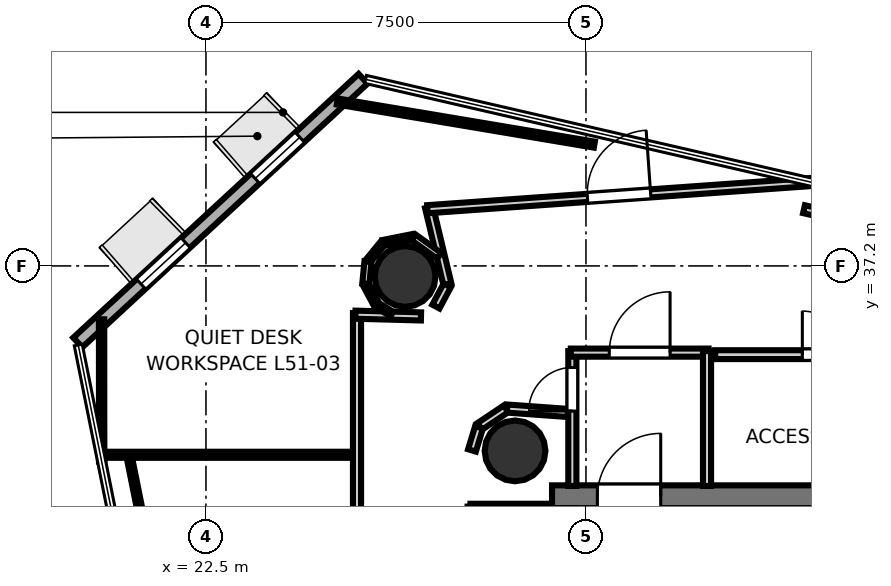
"""IFC4 building model, lengths in metres.
Left out: names, types, materials, properties, quantities, classifications, styles, units other than length and angle.
Written with IfcOpenShell. Run it as: python <this file> out.ifc"""

import sys

from ifc_helpers import new_model, si_unit, direction, frame, frame_2d, origin, origin_2d, place, context, subcontext, project, spatial, rectangle, hollow_circle, extrude, element, fill, save


model = new_model("IFC4")
c1 = context("Model", 3, precision=1e-05, world=origin(), true_north=direction((0.0, 1.0)))
c2 = subcontext(c1, "Body", "Model", "MODEL_VIEW")
j1 = project(units=[si_unit("LENGTHUNIT", "METRE"), si_unit("PLANEANGLEUNIT", "RADIAN")], contexts=[c1])
p1 = place(None, origin())
s1 = spatial("IfcSite", under=j1, at=p1, CompositionType="ELEMENT")
p2 = place(p1, origin())
s2 = spatial("IfcBuilding", under=s1, at=p2, CompositionType="ELEMENT")
p3 = place(p2, frame((0.0, 0.0, 200.3)))
s3 = spatial("IfcBuildingStorey", under=s2, at=p3, CompositionType="ELEMENT", Elevation=200.3)
p4 = place(p3, frame((29.33, 32.645, 0.0), z_axis=(0.0, 0.0, 1.0), x_axis=(1.0, 0.0, 0.0)))
e1 = element("IfcWall", 1, at=p4, inside=s3, PredefinedType="SHEAR", context=c2, shape_type="SweptSolid", body=[
    extrude(rectangle(XDim=10.52, YDim=0.45, at=frame_2d((5.26, 0.0))), origin(), (0.0, 0.0, 1.0), 3.52),
])
p5 = place(p4, frame((0.895, 0.0, 0.0)))
e2 = element("IfcOpeningElement", 2, at=p5, cuts=e1, PredefinedType="OPENING", context=c2, shape_type="SweptSolid", body=[
    extrude(rectangle(XDim=1.25, YDim=2.15, at=frame_2d((0.625, 1.075))), frame((0.0, 0.235, 0.0), z_axis=(0.0, -1.0, 0.0), x_axis=(1.0, 0.0, 0.0)), (0.0, 0.0, 1.0), 0.47),
])
for number, where, z_axis, x_axis in (
    (3, (28.6, 33.55, 0.0), (0.0, 0.0, 1.0), (1.0, 0.0, 0.0)),
    (4, (26.431, 36.992, 0.0), (0.0, 0.0, 1.0), (1.0, 0.0, 0.0)),
):
    element("IfcColumn", number, at=place(p3, frame(where, z_axis=z_axis, x_axis=x_axis)), inside=s3, PredefinedType="COLUMN", context=c2, shape_type="SweptSolid", body=[
        extrude(hollow_circle(Radius=0.6, WallThickness=0.03, at=origin_2d()), origin(), (0.0, 0.0, 1.0), 3.7),
    ])
p6 = place(p3, frame((25.601, 40.893, 0.0), z_axis=(0.0, 0.0, 1.0), x_axis=(-0.734371177533, -0.678748092896, 0.0)))
e5 = element("IfcWall", 5, at=p6, inside=s3, PredefinedType="SOLIDWALL", context=c2, shape_type="SweptSolid", body=[
    extrude(rectangle(XDim=7.668, YDim=0.26, at=frame_2d((3.834, 0.0))), origin(), (0.0, 0.0, 1.0), 3.52),
])
p7 = place(p6, frame((1.7, 0.0, 0.9)))
e6 = element("IfcOpeningElement", 6, at=p7, cuts=e5, PredefinedType="OPENING", context=c2, shape_type="SweptSolid", body=[
    extrude(rectangle(XDim=1.2, YDim=2.0, at=frame_2d((0.6, 1.0))), frame((0.0, 0.14, 0.0), z_axis=(0.0, -1.0, 0.0), x_axis=(1.0, 0.0, 0.0)), (0.0, 0.0, 1.0), 0.28),
])
p8 = place(p6, frame((4.768, 0.0, 0.9)))
e7 = element("IfcOpeningElement", 7, at=p8, cuts=e5, PredefinedType="OPENING", context=c2, shape_type="SweptSolid", body=[
    extrude(rectangle(XDim=1.2, YDim=2.0, at=frame_2d((0.6, 1.0))), frame((0.0, 0.14, 0.0), z_axis=(0.0, -1.0, 0.0), x_axis=(1.0, 0.0, 0.0)), (0.0, 0.0, 1.0), 0.28),
])
p9 = place(p3, frame((29.731, 32.858, 0.0), z_axis=(0.0, 0.0, 1.0), x_axis=(0.0, 1.0, 0.0)))
e8 = element("IfcWall", 8, at=p9, inside=s3, PredefinedType="PARTITIONING", context=c2, shape_type="SweptSolid", body=[
    extrude(rectangle(XDim=2.662, YDim=0.16, at=frame_2d((1.331, 0.0))), origin(), (0.0, 0.0, 1.0), 2.84),
])
p10 = place(p9, frame((1.478, 0.0, 0.0)))
e9 = element("IfcOpeningElement", 9, at=p10, cuts=e8, PredefinedType="OPENING", context=c2, shape_type="SweptSolid", body=[
    extrude(rectangle(XDim=0.86, YDim=2.05, at=frame_2d((0.43, 1.025))), frame((0.0, 0.09, 0.0), z_axis=(0.0, -1.0, 0.0), x_axis=(1.0, 0.0, 0.0)), (0.0, 0.0, 1.0), 0.18),
])
p11 = place(p3, frame((29.7, 35.489, 0.0), z_axis=(0.0, 0.0, 1.0), x_axis=(1.0, 0.0, 0.0)))
e10 = element("IfcWall", 10, at=p11, inside=s3, PredefinedType="PARTITIONING", context=c2, shape_type="SweptSolid", body=[
    extrude(rectangle(XDim=2.72, YDim=0.16, at=frame_2d((1.36, 0.0))), origin(), (0.0, 0.0, 1.0), 2.84),
])
p12 = place(p11, frame((0.76, 0.0, 0.0)))
e11 = element("IfcOpeningElement", 11, at=p12, cuts=e10, PredefinedType="OPENING", context=c2, shape_type="SweptSolid", body=[
    extrude(rectangle(XDim=1.2, YDim=2.15, at=frame_2d((0.6, 1.075))), frame((0.0, 0.09, 0.0), z_axis=(0.0, -1.0, 0.0), x_axis=(1.0, 0.0, 0.0)), (0.0, 0.0, 1.0), 0.18),
])
p13 = place(p3, frame((32.389, 35.52, 0.0), z_axis=(0.0, 0.0, 1.0), x_axis=(0.0, -1.0, 0.0)))
e12 = element("IfcWall", 12, at=p13, inside=s3, PredefinedType="PARTITIONING", context=c2, shape_type="SweptSolid", body=[
    extrude(rectangle(XDim=2.662, YDim=0.16, at=frame_2d((1.331, 0.0))), origin(), (0.0, 0.0, 1.0), 2.84),
])
p14 = place(p3, frame((32.55, 35.449, 0.0), z_axis=(0.0, 0.0, 1.0), x_axis=(1.0, 0.0, 0.0)))
e13 = element("IfcWall", 13, at=p14, inside=s3, PredefinedType="PLUMBINGWALL", context=c2, shape_type="SweptSolid", body=[
    extrude(rectangle(XDim=4.3, YDim=0.175, at=frame_2d((2.15, 0.0))), origin(), (0.0, 0.0, 1.0), 2.84),
])
p15 = place(p14, frame((1.72, 0.0, 0.0)))
e14 = element("IfcOpeningElement", 14, at=p15, cuts=e13, PredefinedType="OPENING", context=c2, shape_type="SweptSolid", body=[
    extrude(rectangle(XDim=0.86, YDim=2.05, at=frame_2d((0.43, 1.025))), frame((0.0, 0.097, 0.0), z_axis=(0.0, -1.0, 0.0), x_axis=(1.0, 0.0, 0.0)), (0.0, 0.0, 1.0), 0.195),
])
p16 = place(p3, frame((27.751, 28.48, 0.0), z_axis=(0.0, 0.0, 1.0), x_axis=(0.0, 1.0, 0.0)))
e15 = element("IfcWall", 15, at=p16, inside=s3, PredefinedType="PLUMBINGWALL", context=c2, shape_type="SweptSolid", body=[
    extrude(rectangle(XDim=3.97, YDim=0.175, at=frame_2d((1.985, 0.0))), origin(), (0.0, 0.0, 1.0), 2.84),
])
p17 = place(p16, frame((1.555, 0.0, 0.0)))
e16 = element("IfcOpeningElement", 16, at=p17, cuts=e15, PredefinedType="OPENING", context=c2, shape_type="SweptSolid", body=[
    extrude(rectangle(XDim=0.86, YDim=2.05, at=frame_2d((0.43, 1.025))), frame((0.0, 0.097, 0.0), z_axis=(0.0, -1.0, 0.0), x_axis=(1.0, 0.0, 0.0)), (0.0, 0.0, 1.0), 0.195),
])
p18 = place(p3, frame((27.72, 32.419, 0.0), z_axis=(0.0, 0.0, 1.0), x_axis=(1.0, 0.0, 0.0)))
e17 = element("IfcWall", 17, at=p18, inside=s3, PredefinedType="PLUMBINGWALL", context=c2, shape_type="SweptSolid", body=[
    extrude(rectangle(XDim=1.5, YDim=0.175, at=frame_2d((0.75, 0.0))), origin(), (0.0, 0.0, 1.0), 2.84),
])
p19 = place(p3, frame((29.189, 32.45, 0.0), z_axis=(0.0, 0.0, 1.0), x_axis=(0.0, -1.0, 0.0)))
e18 = element("IfcWall", 18, at=p19, inside=s3, PredefinedType="PLUMBINGWALL", context=c2, shape_type="SweptSolid", body=[
    extrude(rectangle(XDim=3.97, YDim=0.175, at=frame_2d((1.985, 0.0))), origin(), (0.0, 0.0, 1.0), 2.84),
])
p20 = place(p3, frame((27.265, 36.839, 0.0), z_axis=(0.0, 0.0, 1.0), x_axis=(-0.232734022169, 0.972540423286, 0.0)))
e19 = element("IfcWall", 19, at=p20, inside=s3, PredefinedType="PARTITIONING", context=c2, shape_type="SweptSolid", body=[
    extrude(rectangle(XDim=1.561, YDim=0.16, at=frame_2d((0.781, 0.0))), origin(), (0.0, 0.0, 1.0), 2.84),
])
p21 = place(p3, frame((26.872, 38.319, 0.0), z_axis=(0.0, 0.0, 1.0), x_axis=(0.997497948336, 0.070695424642, 0.0)))
e20 = element("IfcWall", 20, at=p21, inside=s3, PredefinedType="PARTITIONING", context=c2, shape_type="SweptSolid", body=[
    extrude(rectangle(XDim=7.58, YDim=0.16, at=frame_2d((3.79, 0.0))), origin(), (0.0, 0.0, 1.0), 2.84),
])
p22 = place(p21, frame((3.165, 0.0, 0.0)))
e21 = element("IfcOpeningElement", 21, at=p22, cuts=e20, PredefinedType="OPENING", context=c2, shape_type="SweptSolid", body=[
    extrude(rectangle(XDim=1.25, YDim=2.2, at=frame_2d((0.625, 1.1))), frame((0.0, 0.09, 0.0), z_axis=(0.0, -1.0, 0.0), x_axis=(1.0, 0.0, 0.0)), (0.0, 0.0, 1.0), 0.18),
])
p23 = place(p3, frame((34.302, 38.32, 0.0), z_axis=(0.0, 0.0, 1.0), x_axis=(0.974391195695, -0.224859506699, 0.0)))
e22 = element("IfcWall", 22, at=p23, inside=s3, PredefinedType="PARTITIONING", context=c2, shape_type="SweptSolid", body=[
    extrude(rectangle(XDim=2.915, YDim=0.16, at=frame_2d((1.458, 0.0))), origin(), (0.0, 0.0, 1.0), 2.84),
])
p24 = place(p3, frame((29.64, 34.299, 0.0), z_axis=(0.0, 0.0, 1.0), x_axis=(-0.997392224386, 0.072171675429, 0.0)))
e23 = element("IfcWall", 23, at=p24, inside=s3, PredefinedType="PARTITIONING", context=c2, shape_type="SweptSolid", body=[
    extrude(rectangle(XDim=1.201, YDim=0.16, at=frame_2d((0.601, 0.0))), origin(), (0.0, 0.0, 1.0), 2.84),
])
p25 = place(p3, frame((28.423, 34.38, 0.0), z_axis=(0.0, 0.0, 1.0), x_axis=(-0.831571279003, -0.555418047903, 0.0)))
e24 = element("IfcWall", 24, at=p25, inside=s3, PredefinedType="PARTITIONING", context=c2, shape_type="SweptSolid", body=[
    extrude(rectangle(XDim=0.628, YDim=0.16, at=frame_2d((0.314, 0.0))), origin(), (0.0, 0.0, 1.0), 2.84),
])
p26 = place(p3, frame((27.888, 34.015, 0.0), z_axis=(0.0, 0.0, 1.0), x_axis=(-0.290263585829, -0.956946733492, 0.0)))
e25 = element("IfcWall", 25, at=p26, inside=s3, PredefinedType="PARTITIONING", context=c2, shape_type="SweptSolid", body=[
    extrude(rectangle(XDim=0.476, YDim=0.16, at=frame_2d((0.238, 0.0))), origin(), (0.0, 0.0, 1.0), 2.84),
])
p27 = place(p3, frame((25.481, 18.05, 0.0), z_axis=(0.0, 0.0, 1.0), x_axis=(0.0, 1.0, 0.0)))
e26 = element("IfcWall", 26, at=p27, inside=s3, PredefinedType="PARTITIONING", context=c2, shape_type="SweptSolid", body=[
    extrude(rectangle(XDim=18.219, YDim=0.16, at=frame_2d((9.109, 0.0))), origin(), (0.0, 0.0, 1.0), 2.84),
])
p28 = place(p27, frame((0.649, 0.0, 0.0)))
e27 = element("IfcOpeningElement", 27, at=p28, cuts=e26, PredefinedType="OPENING", context=c2, shape_type="SweptSolid", body=[
    extrude(rectangle(XDim=1.05, YDim=2.15, at=frame_2d((0.525, 1.075))), frame((0.0, 0.09, 0.0), z_axis=(0.0, -1.0, 0.0), x_axis=(1.0, 0.0, 0.0)), (0.0, 0.0, 1.0), 0.18),
])
p29 = place(p27, frame((9.975, 0.0, 0.0)))
e28 = element("IfcOpeningElement", 28, at=p29, cuts=e26, PredefinedType="OPENING", context=c2, shape_type="SweptSolid", body=[
    extrude(rectangle(XDim=1.25, YDim=2.2, at=frame_2d((0.625, 1.1))), frame((0.0, 0.09, 0.0), z_axis=(0.0, -1.0, 0.0), x_axis=(1.0, 0.0, 0.0)), (0.0, 0.0, 1.0), 0.18),
])
p30 = place(p3, frame((25.449, 36.238, 0.0), z_axis=(0.0, 0.0, 1.0), x_axis=(0.999651698073, -0.026390955635, 0.0)))
e29 = element("IfcWall", 29, at=p30, inside=s3, PredefinedType="PARTITIONING", context=c2, shape_type="SweptSolid", body=[
    extrude(rectangle(XDim=1.295, YDim=0.16, at=frame_2d((0.647, 0.0))), origin(), (0.0, 0.0, 1.0), 2.84),
])
p31 = place(p3, frame((27.038, 36.398, 0.0), z_axis=(0.0, 0.0, 1.0), x_axis=(0.471865548338, 0.881670519123, 0.0)))
e30 = element("IfcWall", 30, at=p31, inside=s3, PredefinedType="PARTITIONING", context=c2, shape_type="SweptSolid", body=[
    extrude(rectangle(XDim=0.476, YDim=0.16, at=frame_2d((0.238, 0.0))), origin(), (0.0, 0.0, 1.0), 2.84),
])
p32 = place(p3, frame((27.102, 37.399, 0.0), z_axis=(0.0, 0.0, 1.0), x_axis=(-0.811712980853, 0.584056535546, 0.0)))
e31 = element("IfcWall", 31, at=p32, inside=s3, PredefinedType="PARTITIONING", context=c2, shape_type="SweptSolid", body=[
    extrude(rectangle(XDim=0.622, YDim=0.14, at=frame_2d((0.311, 0.0))), origin(), (0.0, 0.0, 1.0), 2.84),
])
p33 = place(p3, frame((26.573, 37.768, 0.0), z_axis=(0.0, 0.0, 1.0), x_axis=(-0.980773892286, -0.195147565217, 0.0)))
e32 = element("IfcWall", 32, at=p33, inside=s3, PredefinedType="PARTITIONING", context=c2, shape_type="SweptSolid", body=[
    extrude(rectangle(XDim=0.582, YDim=0.12, at=frame_2d((0.291, 0.0))), origin(), (0.0, 0.0, 1.0), 2.84),
])
p34 = place(p3, frame((25.985, 37.644, 0.0), z_axis=(0.0, 0.0, 1.0), x_axis=(-0.634562438402, -0.772871601088, 0.0)))
e33 = element("IfcWall", 33, at=p34, inside=s3, PredefinedType="PARTITIONING", context=c2, shape_type="SweptSolid", body=[
    extrude(rectangle(XDim=0.441, YDim=0.105, at=frame_2d((0.221, 0.0))), origin(), (0.0, 0.0, 1.0), 2.84),
])
p35 = place(p3, frame((25.698, 37.286, 0.0), z_axis=(0.0, 0.0, 1.0), x_axis=(-0.097915215421, -0.995194760129, 0.0)))
e34 = element("IfcWall", 34, at=p35, inside=s3, PredefinedType="PARTITIONING", context=c2, shape_type="SweptSolid", body=[
    extrude(rectangle(XDim=0.441, YDim=0.14, at=frame_2d((0.221, 0.0))), origin(), (0.0, 0.0, 1.0), 2.84),
])
p36 = place(p3, frame((25.658, 36.829, 0.0), z_axis=(0.0, 0.0, 1.0), x_axis=(0.471392110461, -0.881923737177, 0.0)))
e35 = element("IfcWall", 35, at=p36, inside=s3, PredefinedType="PARTITIONING", context=c2, shape_type="SweptSolid", body=[
    extrude(rectangle(XDim=0.441, YDim=0.12, at=frame_2d((0.221, 0.0))), origin(), (0.0, 0.0, 1.0), 2.84),
])
p37 = place(p3, frame((25.877, 36.428, 0.0), z_axis=(0.0, 0.0, 1.0), x_axis=(0.852322728649, -0.523016219853, 0.0)))
e36 = element("IfcWall", 36, at=p37, inside=s3, PredefinedType="PARTITIONING", context=c2, shape_type="SweptSolid", body=[
    extrude(rectangle(XDim=0.34, YDim=0.105, at=frame_2d((0.17, 0.0))), origin(), (0.0, 0.0, 1.0), 2.84),
])
p38 = place(p3, frame((25.37, 33.473, 0.0), z_axis=(0.0, 0.0, 1.0), x_axis=(-1.0, 0.0, 0.0)))
e37 = element("IfcWall", 37, at=p38, inside=s3, PredefinedType="PARTITIONING", context=c2, shape_type="SweptSolid", body=[
    extrude(rectangle(XDim=4.975, YDim=0.12, at=frame_2d((2.488, 0.0))), origin(), (0.0, 0.0, 1.0), 2.84),
])
p39 = place(p3, frame((20.442, 33.34, 0.0), z_axis=(0.0, 0.0, 1.0), x_axis=(-0.000608960305, 0.999999814584, 0.0)))
e38 = element("IfcWall", 38, at=p39, inside=s3, PredefinedType="PARTITIONING", context=c2, shape_type="SweptSolid", body=[
    extrude(rectangle(XDim=2.806, YDim=0.105, at=frame_2d((1.403, 0.0))), origin(), (0.0, 0.0, 1.0), 2.84),
])
p40 = place(p3, frame((25.092, 40.445, 0.0), z_axis=(0.0, 0.0, 1.0), x_axis=(0.986203429157, -0.165537899947, 0.0)))
e39 = element("IfcWall", 39, at=p40, inside=s3, PredefinedType="PARTITIONING", context=c2, shape_type="SweptSolid", body=[
    extrude(rectangle(XDim=5.144, YDim=0.12, at=frame_2d((2.572, 0.0))), origin(), (0.0, 0.0, 1.0), 2.84),
])
p41 = place(p3, frame((22.891, 23.948, 0.0), z_axis=(0.0, 0.0, 1.0), x_axis=(-0.196981324141, 0.980407240865, 0.0)))
e40 = element("IfcWall", 40, at=p41, inside=s3, PredefinedType="PARTITIONING", context=c2, shape_type="SweptSolid", body=[
    extrude(rectangle(XDim=9.604, YDim=0.105, at=frame_2d((4.802, 0.0))), origin(), (0.0, 0.0, 1.0), 2.84),
])
p42 = place(p5, origin())
e41 = element("IfcDoor", 41, at=p42, inside=s3, OperationType="SINGLE_SWING_RIGHT", PredefinedType="DOOR", context=c2, shape_type="SweptSolid", body=[
    extrude(rectangle(XDim=1.25, YDim=2.15, at=frame_2d((0.625, 1.075))), frame((0.0, 0.025, 0.0), z_axis=(0.0, -1.0, 0.0), x_axis=(1.0, 0.0, 0.0)), (0.0, 0.0, 1.0), 0.05),
])
fill(e2, e41)
p43 = place(p12, origin())
e42 = element("IfcDoor", 42, at=p43, inside=s3, OperationType="SINGLE_SWING_RIGHT", PredefinedType="DOOR", context=c2, shape_type="SweptSolid", body=[
    extrude(rectangle(XDim=1.2, YDim=2.15, at=frame_2d((0.6, 1.075))), frame((0.0, 0.025, 0.0), z_axis=(0.0, -1.0, 0.0), x_axis=(1.0, 0.0, 0.0)), (0.0, 0.0, 1.0), 0.05),
])
fill(e11, e42)
p44 = place(p15, origin())
e43 = element("IfcDoor", 43, at=p44, inside=s3, OperationType="SINGLE_SWING_LEFT", PredefinedType="DOOR", context=c2, shape_type="SweptSolid", body=[
    extrude(rectangle(XDim=0.86, YDim=2.05, at=frame_2d((0.43, 1.025))), frame((0.0, 0.025, 0.0), z_axis=(0.0, -1.0, 0.0), x_axis=(1.0, 0.0, 0.0)), (0.0, 0.0, 1.0), 0.05),
])
fill(e14, e43)
p45 = place(p10, origin())
e44 = element("IfcDoor", 44, at=p45, inside=s3, OperationType="SINGLE_SWING_LEFT", PredefinedType="DOOR", context=c2, shape_type="SweptSolid", body=[
    extrude(rectangle(XDim=0.86, YDim=2.05, at=frame_2d((0.43, 1.025))), frame((0.0, 0.025, 0.0), z_axis=(0.0, -1.0, 0.0), x_axis=(1.0, 0.0, 0.0)), (0.0, 0.0, 1.0), 0.05),
])
fill(e9, e44)
p46 = place(p22, origin())
e45 = element("IfcDoor", 45, at=p46, inside=s3, OperationType="SINGLE_SWING_RIGHT", PredefinedType="DOOR", context=c2, shape_type="SweptSolid", body=[
    extrude(rectangle(XDim=1.25, YDim=2.2, at=frame_2d((0.625, 1.1))), frame((0.0, 0.025, 0.0), z_axis=(0.0, -1.0, 0.0), x_axis=(1.0, 0.0, 0.0)), (0.0, 0.0, 1.0), 0.05),
])
fill(e21, e45)
p47 = place(p7, origin())
e46 = element("IfcWindow", 46, at=p47, inside=s3, PartitioningType="SINGLE_PANEL", PredefinedType="WINDOW", context=c2, shape_type="SweptSolid", body=[
    extrude(rectangle(XDim=1.2, YDim=2.0, at=frame_2d((0.6, 1.0))), frame((0.0, 0.03, 0.0), z_axis=(0.0, -1.0, 0.0), x_axis=(1.0, 0.0, 0.0)), (0.0, 0.0, 1.0), 0.06),
])
fill(e6, e46)
p48 = place(p8, origin())
e47 = element("IfcWindow", 47, at=p48, inside=s3, PartitioningType="SINGLE_PANEL", PredefinedType="WINDOW", context=c2, shape_type="SweptSolid", body=[
    extrude(rectangle(XDim=1.2, YDim=2.0, at=frame_2d((0.6, 1.0))), frame((0.0, 0.03, 0.0), z_axis=(0.0, -1.0, 0.0), x_axis=(1.0, 0.0, 0.0)), (0.0, 0.0, 1.0), 0.06),
])
fill(e7, e47)
save(model, sys.argv[1])
